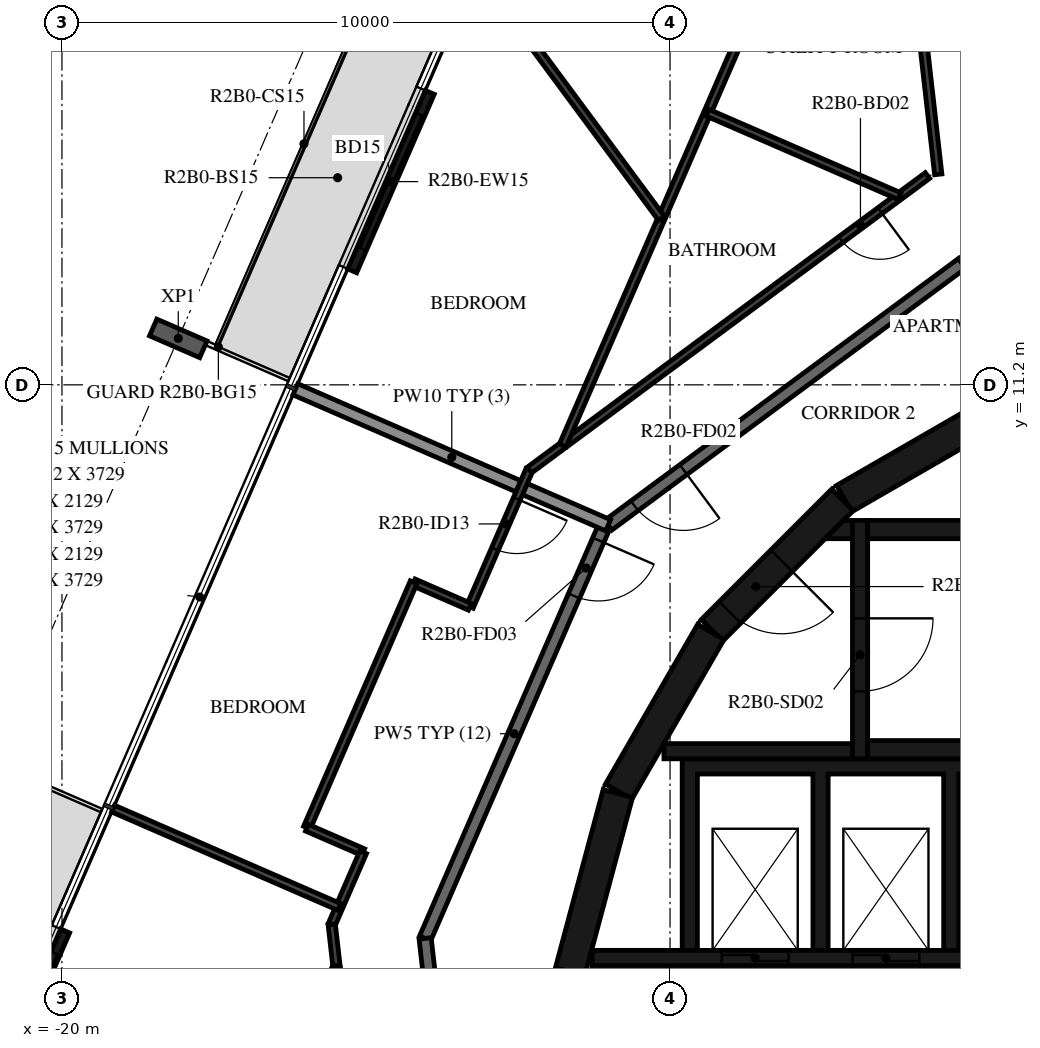
"""IFC4 building model, lengths in metres.
Left out: names, types, materials, properties, quantities, classifications, styles, units other than length and angle.
Written with IfcOpenShell. Run it as: python <this file> out.ifc"""

import sys

from ifc_helpers import new_model, si_unit, direction, frame, frame_2d, origin, origin_2d, place, context, subcontext, project, spatial, polyline, rectangle, i_section, outline, extrude, element, fill, save


model = new_model("IFC4")
c1 = context("Model", 3, precision=1e-05, world=origin(), true_north=direction((0.0, 1.0)))
c2 = subcontext(c1, "Body", "Model", "MODEL_VIEW")
j1 = project(units=[si_unit("LENGTHUNIT", "METRE"), si_unit("PLANEANGLEUNIT", "RADIAN")], contexts=[c1])
p1 = place(None, origin())
s1 = spatial("IfcSite", under=j1, at=p1, CompositionType="ELEMENT")
p2 = place(p1, origin())
s2 = spatial("IfcBuilding", under=s1, at=p2, CompositionType="ELEMENT")
p3 = place(p2, frame((0.0, 0.0, 90.7)))
s3 = spatial("IfcBuildingStorey", under=s2, at=p3, CompositionType="ELEMENT", Elevation=90.7)
p4 = place(p3, frame((-18.087, 11.964, -0.38), z_axis=(0.0, 0.0, 1.0), x_axis=(0.398749038162, 0.917060087761, 0.0)))
e1 = element("IfcColumn", 1, at=p4, inside=s3, PredefinedType="COLUMN", context=c2, shape_type="SweptSolid", body=[
    extrude(i_section(OverallWidth=0.3, OverallDepth=0.9, WebThickness=0.019, FlangeThickness=0.035, FilletRadius=0.03, at=origin_2d()), origin(), (0.0, 0.0, 1.0), 3.5),
])
p5 = place(p3, frame((-13.951, 16.01, 0.0), z_axis=(0.0, 0.0, 1.0), x_axis=(-0.398720531764, -0.917072482168, 0.0)))
e2 = element("IfcWall", 2, at=p5, inside=s3, PredefinedType="STANDARD", context=c2, shape_type="SweptSolid", body=[
    extrude(rectangle(XDim=3.2, YDim=0.16, at=frame_2d((1.6, 0.0))), origin(), (0.0, 0.0, 1.0), 3.12),
])
p6 = place(p5, frame((0.4, 0.0, 0.0)))
e3 = element("IfcOpeningElement", 3, at=p6, cuts=e2, PredefinedType="OPENING", context=c2, shape_type="SweptSolid", body=[
    extrude(rectangle(XDim=2.4, YDim=2.4, at=frame_2d((1.2, 1.2))), frame((0.0, 0.09, 0.0), z_axis=(0.0, -1.0, 0.0), x_axis=(1.0, 0.0, 0.0)), (0.0, 0.0, 1.0), 0.18),
])
p7 = place(p3, frame((-19.947, 2.219, 0.0), z_axis=(0.0, 0.0, 1.0), x_axis=(-0.398784695066, -0.917044582876, 0.0)))
e4 = element("IfcWall", 4, at=p7, inside=s3, PredefinedType="STANDARD", context=c2, shape_type="SweptSolid", body=[
    extrude(rectangle(XDim=3.2, YDim=0.16, at=frame_2d((1.6, 0.0))), origin(), (0.0, 0.0, 1.0), 3.12),
])
p8 = place(p7, frame((0.4, 0.0, 0.0)))
e5 = element("IfcOpeningElement", 5, at=p8, cuts=e4, PredefinedType="OPENING", context=c2, shape_type="SweptSolid", body=[
    extrude(rectangle(XDim=2.4, YDim=2.4, at=frame_2d((1.2, 1.2))), frame((0.0, 0.09, 0.0), z_axis=(0.0, -1.0, 0.0), x_axis=(1.0, 0.0, 0.0)), (0.0, 0.0, 1.0), 0.18),
])
p9 = place(p3, frame((-4.51, 10.845, 0.0), z_axis=(0.0, 0.0, 1.0), x_axis=(-0.865975092491, -0.500087131594, 0.0)))
e6 = element("IfcWall", 6, at=p9, inside=s3, PredefinedType="SHEAR", context=c2, shape_type="SweptSolid", body=[
    extrude(rectangle(XDim=3.033, YDim=0.5, at=frame_2d((1.516, 0.0))), origin(), (0.0, 0.0, 1.0), 3.12),
])
p10 = place(p3, frame((-7.164, 9.308, 0.0), z_axis=(0.0, 0.0, 1.0), x_axis=(-0.707106781187, -0.707106781187, 0.0)))
e7 = element("IfcWall", 7, at=p10, inside=s3, PredefinedType="SHEAR", context=c2, shape_type="SweptSolid", body=[
    extrude(rectangle(XDim=3.032, YDim=0.5, at=frame_2d((1.516, 0.0))), origin(), (0.0, 0.0, 1.0), 3.12),
])
p11 = place(p10, frame((1.416, 0.0, 0.0)))
e8 = element("IfcOpeningElement", 8, at=p11, cuts=e7, PredefinedType="OPENING", context=c2, shape_type="SweptSolid", body=[
    extrude(rectangle(XDim=1.2, YDim=2.1, at=frame_2d((0.6, 1.05))), frame((0.0, 0.26, 0.0), z_axis=(0.0, -1.0, 0.0), x_axis=(1.0, 0.0, 0.0)), (0.0, 0.0, 1.0), 0.52),
])
for number, where, z_axis, x_axis in (
    (9, (-9.329, 7.137, 0.0), (0.0, 0.0, 1.0), (-0.5, -0.866, 0.0)),
    (10, (-10.858, 4.479, 0.0), (0.0, 0.0, 1.0), (-0.259, -0.966, 0.0)),
):
    element("IfcWall", number, at=place(p3, frame(where, z_axis=z_axis, x_axis=x_axis)), inside=s3, PredefinedType="SHEAR", context=c2, shape_type="SweptSolid", body=[
        extrude(rectangle(XDim=3.033, YDim=0.5, at=frame_2d((1.516, 0.0))), origin(), (0.0, 0.0, 1.0), 3.12),
    ])
for number, where, z_axis, x_axis in (
    (11, (-6.75, 5.2, 0.0), (0.0, 0.0, 1.0), (1.0, 0.0, 0.0)),
    (12, (-6.75, 8.82, 0.0), (0.0, 0.0, 1.0), (1.0, 0.0, 0.0)),
):
    element("IfcWall", number, at=place(p3, frame(where, z_axis=z_axis, x_axis=x_axis)), inside=s3, PredefinedType="SHEAR", context=c2, shape_type="SweptSolid", body=[
        extrude(rectangle(XDim=6.75, YDim=0.3, at=frame_2d((3.375, 0.0))), origin(), (0.0, 0.0, 1.0), 3.12),
    ])
p12 = place(p3, frame((-6.875, 8.97, 0.0), z_axis=(0.0, 0.0, 1.0), x_axis=(0.0, -1.0, 0.0)))
e13 = element("IfcWall", 13, at=p12, inside=s3, PredefinedType="SHEAR", context=c2, shape_type="SweptSolid", body=[
    extrude(rectangle(XDim=3.92, YDim=0.25, at=frame_2d((1.96, 0.0))), origin(), (0.0, 0.0, 1.0), 3.12),
])
p13 = place(p12, frame((1.61, 0.0, 0.0)))
e14 = element("IfcOpeningElement", 14, at=p13, cuts=e13, PredefinedType="OPENING", context=c2, shape_type="SweptSolid", body=[
    extrude(rectangle(XDim=1.2, YDim=2.1, at=frame_2d((0.6, 1.05))), frame((0.0, 0.135, 0.0), z_axis=(0.0, -1.0, 0.0), x_axis=(1.0, 0.0, 0.0)), (0.0, 0.0, 1.0), 0.27),
])
p14 = place(p3, frame((-7.0, 5.175, 0.0), z_axis=(0.0, 0.0, 1.0), x_axis=(-1.0, 0.0, 0.0)))
e15 = element("IfcWall", 15, at=p14, inside=s3, PredefinedType="SHEAR", context=c2, shape_type="SweptSolid", body=[
    extrude(rectangle(XDim=3.1, YDim=0.25, at=frame_2d((1.55, 0.0))), origin(), (0.0, 0.0, 1.0), 3.12),
])
p15 = place(p3, origin())
e16 = element("IfcWall", 16, at=p15, inside=s3, PredefinedType="SHEAR", context=c2, shape_type="SweptSolid", body=[
    extrude(outline(polyline([(-7.148, 8.97), (-7.0, 8.97), (-7.0, 8.67), (-7.448, 8.67), (-7.148, 8.97)])), origin(), (0.0, 0.0, 1.0), 3.12),
])
p16 = place(p3, origin())
e17 = element("IfcWall", 17, at=p16, inside=s3, PredefinedType="SHEAR", context=c2, shape_type="SweptSolid", body=[
    extrude(outline(polyline([(-9.55, 4.8), (-7.65, 4.8), (-7.65, 1.9), (-7.4, 1.9), (-7.4, 4.8), (-5.5, 4.8), (-5.5, 1.9), (-5.25, 1.9), (-5.25, 4.8), (-3.35, 4.8), (-3.35, 1.9), (-3.1, 1.9), (-3.1, 4.8), (-1.2, 4.8), (-1.2, 1.9), (-0.95, 1.9), (-0.95, 4.8), (0.95, 4.8), (0.95, 1.9), (1.2, 1.9), (1.2, 4.8), (3.1, 4.8), (3.1, 1.9), (3.35, 1.9), (3.35, 4.8), (5.25, 4.8), (5.25, 1.9), (5.5, 1.9), (5.5, 4.8), (7.4, 4.8), (7.4, 1.9), (7.65, 1.9), (7.65, 4.8), (9.55, 4.8), (9.55, 1.9), (9.8, 1.9), (9.8, 4.8), (9.8, 5.05), (-9.8, 5.05), (-9.8, 4.8), (-9.8, 1.9), (-9.55, 1.9), (-9.55, 4.8)])), origin(), (0.0, 0.0, 1.0), 3.12),
])
p17 = place(p3, frame((-11.28, 1.775, 0.0), z_axis=(0.0, 0.0, 1.0), x_axis=(1.0, 0.0, 0.0)))
e18 = element("IfcWall", 18, at=p17, inside=s3, PredefinedType="SHEAR", context=c2, shape_type="SweptSolid", body=[
    extrude(rectangle(XDim=14.38, YDim=0.25, at=frame_2d((7.19, 0.0))), origin(), (0.0, 0.0, 1.0), 3.12),
])
p18 = place(p17, frame((2.13, 0.0, 0.0)))
e19 = element("IfcOpeningElement", 19, at=p18, cuts=e18, PredefinedType="OPENING", context=c2, shape_type="SweptSolid", body=[
    extrude(rectangle(XDim=1.1, YDim=2.1, at=frame_2d((0.55, 1.05))), frame((0.0, 0.135, 0.0), z_axis=(0.0, -1.0, 0.0), x_axis=(1.0, 0.0, 0.0)), (0.0, 0.0, 1.0), 0.27),
])
p19 = place(p17, frame((4.28, 0.0, 0.0)))
e20 = element("IfcOpeningElement", 20, at=p19, cuts=e18, PredefinedType="OPENING", context=c2, shape_type="SweptSolid", body=[
    extrude(rectangle(XDim=1.1, YDim=2.1, at=frame_2d((0.55, 1.05))), frame((0.0, 0.135, 0.0), z_axis=(0.0, -1.0, 0.0), x_axis=(1.0, 0.0, 0.0)), (0.0, 0.0, 1.0), 0.27),
])
p20 = place(p17, frame((6.43, 0.0, 0.0)))
e21 = element("IfcOpeningElement", 21, at=p20, cuts=e18, PredefinedType="OPENING", context=c2, shape_type="SweptSolid", body=[
    extrude(rectangle(XDim=1.1, YDim=2.1, at=frame_2d((0.55, 1.05))), frame((0.0, 0.135, 0.0), z_axis=(0.0, -1.0, 0.0), x_axis=(1.0, 0.0, 0.0)), (0.0, 0.0, 1.0), 0.27),
])
p21 = place(p17, frame((8.58, 0.0, 0.0)))
e22 = element("IfcOpeningElement", 22, at=p21, cuts=e18, PredefinedType="OPENING", context=c2, shape_type="SweptSolid", body=[
    extrude(rectangle(XDim=1.1, YDim=2.1, at=frame_2d((0.55, 1.05))), frame((0.0, 0.135, 0.0), z_axis=(0.0, -1.0, 0.0), x_axis=(1.0, 0.0, 0.0)), (0.0, 0.0, 1.0), 0.27),
])
p22 = place(p17, frame((10.83, 0.0, 0.0)))
e23 = element("IfcOpeningElement", 23, at=p22, cuts=e18, PredefinedType="OPENING", context=c2, shape_type="SweptSolid", body=[
    extrude(rectangle(XDim=0.9, YDim=2.1, at=frame_2d((0.45, 1.05))), frame((0.0, 0.135, 0.0), z_axis=(0.0, -1.0, 0.0), x_axis=(1.0, 0.0, 0.0)), (0.0, 0.0, 1.0), 0.27),
])
p23 = place(p17, frame((12.98, 0.0, 0.0)))
e24 = element("IfcOpeningElement", 24, at=p23, cuts=e18, PredefinedType="OPENING", context=c2, shape_type="SweptSolid", body=[
    extrude(rectangle(XDim=0.9, YDim=2.1, at=frame_2d((0.45, 1.05))), frame((0.0, 0.135, 0.0), z_axis=(0.0, -1.0, 0.0), x_axis=(1.0, 0.0, 0.0)), (0.0, 0.0, 1.0), 0.27),
])
p24 = place(p3, frame((-5.198, 13.196, 0.0), z_axis=(0.0, 0.0, 1.0), x_axis=(-0.803864151363, -0.594812933748, 0.0)))
e25 = element("IfcWall", 25, at=p24, inside=s3, PredefinedType="STANDARD", context=c2, shape_type="SweptSolid", body=[
    extrude(rectangle(XDim=7.24, YDim=0.2, at=frame_2d((3.62, 0.0))), origin(), (0.0, 0.0, 1.0), 3.12),
])
p25 = place(p24, frame((5.7, 0.0, 0.0)))
e26 = element("IfcOpeningElement", 26, at=p25, cuts=e25, PredefinedType="OPENING", context=c2, shape_type="SweptSolid", body=[
    extrude(rectangle(XDim=1.0, YDim=2.1, at=frame_2d((0.5, 1.05))), frame((0.0, 0.11, 0.0), z_axis=(0.0, -1.0, 0.0), x_axis=(1.0, 0.0, 0.0)), (0.0, 0.0, 1.0), 0.22),
])
p26 = place(p3, frame((-11.1, 8.829, 0.0), z_axis=(0.0, 0.0, 1.0), x_axis=(-0.398741918631, -0.917063183388, 0.0)))
e27 = element("IfcWall", 27, at=p26, inside=s3, PredefinedType="STANDARD", context=c2, shape_type="SweptSolid", body=[
    extrude(rectangle(XDim=7.342, YDim=0.2, at=frame_2d((3.671, 0.0))), origin(), (0.0, 0.0, 1.0), 3.12),
])
p27 = place(p26, frame((0.2, 0.0, 0.0)))
e28 = element("IfcOpeningElement", 28, at=p27, cuts=e27, PredefinedType="OPENING", context=c2, shape_type="SweptSolid", body=[
    extrude(rectangle(XDim=1.0, YDim=2.1, at=frame_2d((0.5, 1.05))), frame((0.0, 0.11, 0.0), z_axis=(0.0, -1.0, 0.0), x_axis=(1.0, 0.0, 0.0)), (0.0, 0.0, 1.0), 0.22),
])
p28 = place(p3, frame((-14.028, 2.096, 0.0), z_axis=(0.0, 0.0, 1.0), x_axis=(0.113226782163, -0.993569170114, 0.0)))
e29 = element("IfcWall", 29, at=p28, inside=s3, PredefinedType="STANDARD", context=c2, shape_type="SweptSolid", body=[
    extrude(rectangle(XDim=7.342, YDim=0.2, at=frame_2d((3.671, 0.0))), origin(), (0.0, 0.0, 1.0), 3.12),
])
p29 = place(p3, frame((-16.161, 11.126, 0.0), z_axis=(0.0, 0.0, 1.0), x_axis=(0.917063135481, -0.398742028813, 0.0)))
e30 = element("IfcWall", 30, at=p29, inside=s3, PredefinedType="STANDARD", context=c2, shape_type="SweptSolid", body=[
    extrude(rectangle(XDim=5.608, YDim=0.2, at=frame_2d((2.804, 0.0))), origin(), (0.0, 0.0, 1.0), 2.73),
])
p30 = place(p3, frame((-6.042, 18.644, 0.0), z_axis=(0.0, 0.0, 1.0), x_axis=(0.113185787648, -0.993573840977, 0.0)))
e31 = element("IfcWall", 31, at=p30, inside=s3, PredefinedType="PARTITIONING", context=c2, shape_type="SweptSolid", body=[
    extrude(rectangle(XDim=4.008, YDim=0.12, at=frame_2d((2.004, 0.0))), origin(), (0.0, 0.0, 1.0), 3.12),
])
p31 = place(p3, frame((-5.767, 14.641, 0.0), z_axis=(0.0, 0.0, 1.0), x_axis=(-0.803853364238, -0.594827511807, 0.0)))
e32 = element("IfcWall", 32, at=p31, inside=s3, PredefinedType="PARTITIONING", context=c2, shape_type="SweptSolid", body=[
    extrude(rectangle(XDim=8.146, YDim=0.12, at=frame_2d((4.073, 0.0))), origin(), (0.0, 0.0, 1.0), 3.12),
])
p32 = place(p31, frame((0.97, 0.0, 0.0)))
e33 = element("IfcOpeningElement", 33, at=p32, cuts=e32, PredefinedType="OPENING", context=c2, shape_type="SweptSolid", body=[
    extrude(rectangle(XDim=0.8, YDim=2.1, at=frame_2d((0.4, 1.05))), frame((0.0, 0.07, 0.0), z_axis=(0.0, -1.0, 0.0), x_axis=(1.0, 0.0, 0.0)), (0.0, 0.0, 1.0), 0.14),
])
p33 = place(p3, frame((-12.315, 9.796, 0.0), z_axis=(0.0, 0.0, 1.0), x_axis=(-0.398762563957, -0.91705420646, 0.0)))
e34 = element("IfcWall", 34, at=p33, inside=s3, PredefinedType="PARTITIONING", context=c2, shape_type="SweptSolid", body=[
    extrude(rectangle(XDim=2.449, YDim=0.12, at=frame_2d((1.225, 0.0))), origin(), (0.0, 0.0, 1.0), 3.12),
])
p34 = place(p33, frame((0.513, 0.0, 0.0)))
e35 = element("IfcOpeningElement", 35, at=p34, cuts=e34, PredefinedType="OPENING", context=c2, shape_type="SweptSolid", body=[
    extrude(rectangle(XDim=0.9, YDim=2.1, at=frame_2d((0.45, 1.05))), frame((0.0, 0.07, 0.0), z_axis=(0.0, -1.0, 0.0), x_axis=(1.0, 0.0, 0.0)), (0.0, 0.0, 1.0), 0.14),
])
p35 = place(p3, frame((-5.952, 23.571, 0.0), z_axis=(0.0, 0.0, 1.0), x_axis=(-0.398745097158, -0.917061801348, 0.0)))
e36 = element("IfcWall", 36, at=p35, inside=s3, PredefinedType="PARTITIONING", context=c2, shape_type="SweptSolid", body=[
    extrude(rectangle(XDim=14.576, YDim=0.12, at=frame_2d((7.288, 0.0))), origin(), (0.0, 0.0, 1.0), 3.12),
])
p36 = place(p35, frame((3.201, 0.0, 0.0)))
e37 = element("IfcOpeningElement", 37, at=p36, cuts=e36, PredefinedType="OPENING", context=c2, shape_type="SweptSolid", body=[
    extrude(rectangle(XDim=0.9, YDim=2.1, at=frame_2d((0.45, 1.05))), frame((0.0, 0.07, 0.0), z_axis=(0.0, -1.0, 0.0), x_axis=(1.0, 0.0, 0.0)), (0.0, 0.0, 1.0), 0.14),
])
p37 = place(p35, frame((0.2, 0.0, 0.0)))
e38 = element("IfcOpeningElement", 38, at=p37, cuts=e36, PredefinedType="OPENING", context=c2, shape_type="SweptSolid", body=[
    extrude(rectangle(XDim=0.9, YDim=2.1, at=frame_2d((0.45, 1.05))), frame((0.0, 0.07, 0.0), z_axis=(0.0, -1.0, 0.0), x_axis=(1.0, 0.0, 0.0)), (0.0, 0.0, 1.0), 0.14),
])
p38 = place(p3, frame((-9.385, 15.676, 0.0), z_axis=(0.0, 0.0, 1.0), x_axis=(0.917068929701, -0.398728702475, 0.0)))
e39 = element("IfcWall", 39, at=p38, inside=s3, PredefinedType="PARTITIONING", context=c2, shape_type="SweptSolid", body=[
    extrude(rectangle(XDim=3.445, YDim=0.12, at=frame_2d((1.723, 0.0))), origin(), (0.0, 0.0, 1.0), 3.12),
])
p39 = place(p3, frame((-13.163, 18.022, 0.0), z_axis=(0.0, 0.0, 1.0), x_axis=(0.594797671626, -0.803875444226, 0.0)))
e40 = element("IfcWall", 40, at=p39, inside=s3, PredefinedType="PARTITIONING", context=c2, shape_type="SweptSolid", body=[
    extrude(rectangle(XDim=5.081, YDim=0.12, at=frame_2d((2.54, 0.0))), origin(), (0.0, 0.0, 1.0), 3.12),
])
p40 = place(p39, frame((0.4, 0.0, 0.0)))
e41 = element("IfcOpeningElement", 41, at=p40, cuts=e40, PredefinedType="OPENING", context=c2, shape_type="SweptSolid", body=[
    extrude(rectangle(XDim=0.9, YDim=2.1, at=frame_2d((0.45, 1.05))), frame((0.0, 0.07, 0.0), z_axis=(0.0, -1.0, 0.0), x_axis=(1.0, 0.0, 0.0)), (0.0, 0.0, 1.0), 0.14),
])
p41 = place(p3, frame((-13.292, 7.55, 0.0), z_axis=(0.0, 0.0, 1.0), x_axis=(-0.917016180017, 0.398850003871, 0.0)))
e42 = element("IfcWall", 42, at=p41, inside=s3, PredefinedType="PARTITIONING", context=c2, shape_type="SweptSolid", body=[
    extrude(rectangle(XDim=1.009, YDim=0.12, at=frame_2d((0.504, 0.0))), origin(), (0.0, 0.0, 1.0), 3.12),
])
p42 = place(p3, frame((-14.217, 7.952, 0.0), z_axis=(0.0, 0.0, 1.0), x_axis=(-0.398722053614, -0.917071820503, 0.0)))
e43 = element("IfcWall", 43, at=p42, inside=s3, PredefinedType="PARTITIONING", context=c2, shape_type="SweptSolid", body=[
    extrude(rectangle(XDim=4.4, YDim=0.12, at=frame_2d((2.2, 0.0))), origin(), (0.0, 0.0, 1.0), 3.12),
])
p43 = place(p3, frame((-15.971, 3.917, 0.0), z_axis=(0.0, 0.0, 1.0), x_axis=(0.916977666233, -0.39893854117, 0.0)))
e44 = element("IfcWall", 44, at=p43, inside=s3, PredefinedType="PARTITIONING", context=c2, shape_type="SweptSolid", body=[
    extrude(rectangle(XDim=1.009, YDim=0.12, at=frame_2d((0.504, 0.0))), origin(), (0.0, 0.0, 1.0), 3.12),
])
p44 = place(p3, frame((-15.046, 3.515, 0.0), z_axis=(0.0, 0.0, 1.0), x_axis=(-0.398664137006, -0.917096999158, 0.0)))
e45 = element("IfcWall", 45, at=p44, inside=s3, PredefinedType="PARTITIONING", context=c2, shape_type="SweptSolid", body=[
    extrude(rectangle(XDim=1.296, YDim=0.12, at=frame_2d((0.648, 0.0))), origin(), (0.0, 0.0, 1.0), 3.12),
])
p45 = place(p3, frame((-15.563, 2.326, 0.0), z_axis=(0.0, 0.0, 1.0), x_axis=(0.113175769889, -0.993574982128, 0.0)))
e46 = element("IfcWall", 46, at=p45, inside=s3, PredefinedType="PARTITIONING", context=c2, shape_type="SweptSolid", body=[
    extrude(rectangle(XDim=7.576, YDim=0.12, at=frame_2d((3.788, 0.0))), origin(), (0.0, 0.0, 1.0), 3.12),
])
p46 = place(p45, frame((2.185, 0.0, 0.0)))
e47 = element("IfcOpeningElement", 47, at=p46, cuts=e46, PredefinedType="OPENING", context=c2, shape_type="SweptSolid", body=[
    extrude(rectangle(XDim=0.8, YDim=2.1, at=frame_2d((0.4, 1.05))), frame((0.0, 0.07, 0.0), z_axis=(0.0, -1.0, 0.0), x_axis=(1.0, 0.0, 0.0)), (0.0, 0.0, 1.0), 0.14),
])
p47 = place(p3, frame((-19.159, 4.231, 0.0), z_axis=(0.0, 0.0, 1.0), x_axis=(0.91704996524, -0.398772317562, 0.0)))
e48 = element("IfcWall", 48, at=p47, inside=s3, PredefinedType="PARTITIONING", context=c2, shape_type="SweptSolid", body=[
    extrude(rectangle(XDim=4.057, YDim=0.12, at=frame_2d((2.029, 0.0))), origin(), (0.0, 0.0, 1.0), 2.73),
])
p48 = place(p3, frame((-17.109, -2.089, 0.0), z_axis=(0.0, 0.0, 1.0), x_axis=(0.398726111414, 0.917070056253, 0.0)))
e49 = element("IfcWall", 49, at=p48, inside=s3, PredefinedType="PARTITIONING", context=c2, shape_type="SweptSolid", body=[
    extrude(rectangle(XDim=4.072, YDim=0.12, at=frame_2d((2.036, 0.0))), origin(), (0.0, 0.0, 1.0), 3.12),
])
p49 = place(p6, origin())
e50 = element("IfcDoor", 50, at=p49, inside=s3, OperationType="DOUBLE_DOOR_SLIDING", PredefinedType="DOOR", context=c2, shape_type="SweptSolid", body=[
    extrude(rectangle(XDim=2.4, YDim=2.4, at=frame_2d((1.2, 1.2))), frame((0.0, 0.025, 0.0), z_axis=(0.0, -1.0, 0.0), x_axis=(1.0, 0.0, 0.0)), (0.0, 0.0, 1.0), 0.05),
])
fill(e3, e50)
p50 = place(p8, origin())
e51 = element("IfcDoor", 51, at=p50, inside=s3, OperationType="DOUBLE_DOOR_SLIDING", PredefinedType="DOOR", context=c2, shape_type="SweptSolid", body=[
    extrude(rectangle(XDim=2.4, YDim=2.4, at=frame_2d((1.2, 1.2))), frame((0.0, 0.025, 0.0), z_axis=(0.0, -1.0, 0.0), x_axis=(1.0, 0.0, 0.0)), (0.0, 0.0, 1.0), 0.05),
])
fill(e5, e51)
p51 = place(p13, origin())
e52 = element("IfcDoor", 52, at=p51, inside=s3, OperationType="SINGLE_SWING_LEFT", PredefinedType="DOOR", context=c2, shape_type="SweptSolid", body=[
    extrude(rectangle(XDim=1.2, YDim=2.1, at=frame_2d((0.6, 1.05))), frame((0.0, 0.025, 0.0), z_axis=(0.0, -1.0, 0.0), x_axis=(1.0, 0.0, 0.0)), (0.0, 0.0, 1.0), 0.05),
])
fill(e14, e52)
p52 = place(p11, origin())
e53 = element("IfcDoor", 53, at=p52, inside=s3, OperationType="SINGLE_SWING_RIGHT", PredefinedType="DOOR", context=c2, shape_type="SweptSolid", body=[
    extrude(rectangle(XDim=1.2, YDim=2.1, at=frame_2d((0.6, 1.05))), frame((0.0, 0.025, 0.0), z_axis=(0.0, -1.0, 0.0), x_axis=(1.0, 0.0, 0.0)), (0.0, 0.0, 1.0), 0.05),
])
fill(e8, e53)
p53 = place(p18, origin())
e54 = element("IfcDoor", 54, at=p53, inside=s3, OperationType="DOUBLE_DOOR_SLIDING", PredefinedType="DOOR", context=c2, shape_type="SweptSolid", body=[
    extrude(rectangle(XDim=1.1, YDim=2.1, at=frame_2d((0.55, 1.05))), frame((0.0, 0.025, 0.0), z_axis=(0.0, -1.0, 0.0), x_axis=(1.0, 0.0, 0.0)), (0.0, 0.0, 1.0), 0.05),
])
fill(e19, e54)
p54 = place(p19, origin())
e55 = element("IfcDoor", 55, at=p54, inside=s3, OperationType="DOUBLE_DOOR_SLIDING", PredefinedType="DOOR", context=c2, shape_type="SweptSolid", body=[
    extrude(rectangle(XDim=1.1, YDim=2.1, at=frame_2d((0.55, 1.05))), frame((0.0, 0.025, 0.0), z_axis=(0.0, -1.0, 0.0), x_axis=(1.0, 0.0, 0.0)), (0.0, 0.0, 1.0), 0.05),
])
fill(e20, e55)
p55 = place(p25, origin())
e56 = element("IfcDoor", 56, at=p55, inside=s3, OperationType="SINGLE_SWING_LEFT", PredefinedType="DOOR", context=c2, shape_type="SweptSolid", body=[
    extrude(rectangle(XDim=1.0, YDim=2.1, at=frame_2d((0.5, 1.05))), frame((0.0, 0.025, 0.0), z_axis=(0.0, -1.0, 0.0), x_axis=(1.0, 0.0, 0.0)), (0.0, 0.0, 1.0), 0.05),
])
fill(e26, e56)
p56 = place(p32, origin())
e57 = element("IfcDoor", 57, at=p56, inside=s3, OperationType="SINGLE_SWING_LEFT", PredefinedType="DOOR", context=c2, shape_type="SweptSolid", body=[
    extrude(rectangle(XDim=0.8, YDim=2.1, at=frame_2d((0.4, 1.05))), frame((0.0, 0.025, 0.0), z_axis=(0.0, -1.0, 0.0), x_axis=(1.0, 0.0, 0.0)), (0.0, 0.0, 1.0), 0.05),
])
fill(e33, e57)
p57 = place(p27, origin())
e58 = element("IfcDoor", 58, at=p57, inside=s3, OperationType="SINGLE_SWING_LEFT", PredefinedType="DOOR", context=c2, shape_type="SweptSolid", body=[
    extrude(rectangle(XDim=1.0, YDim=2.1, at=frame_2d((0.5, 1.05))), frame((0.0, 0.025, 0.0), z_axis=(0.0, -1.0, 0.0), x_axis=(1.0, 0.0, 0.0)), (0.0, 0.0, 1.0), 0.05),
])
fill(e28, e58)
p58 = place(p34, origin())
e59 = element("IfcDoor", 59, at=p58, inside=s3, OperationType="SINGLE_SWING_LEFT", PredefinedType="DOOR", context=c2, shape_type="SweptSolid", body=[
    extrude(rectangle(XDim=0.9, YDim=2.1, at=frame_2d((0.45, 1.05))), frame((0.0, 0.025, 0.0), z_axis=(0.0, -1.0, 0.0), x_axis=(1.0, 0.0, 0.0)), (0.0, 0.0, 1.0), 0.05),
])
fill(e35, e59)
save(model, sys.argv[1])
